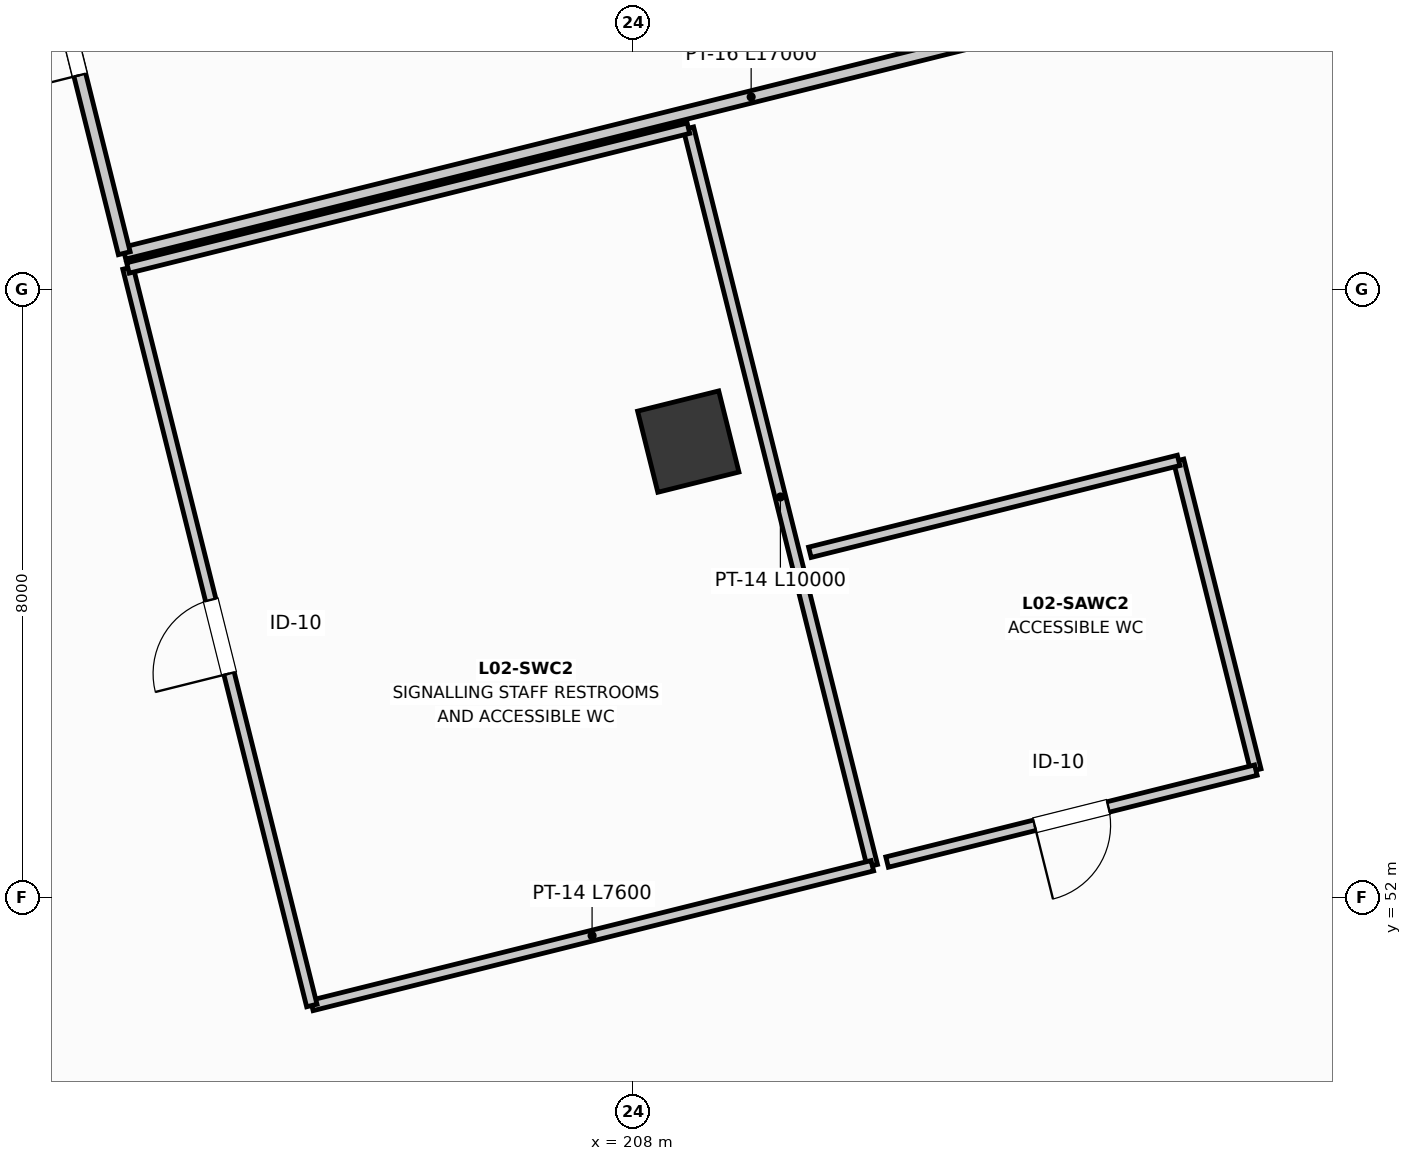
"""IFC4 building model, lengths in metres.
Left out: names, types, materials, properties, quantities, classifications, styles, units other than length and angle.
Written with IfcOpenShell. Run it as: python <this file> out.ifc"""

import sys

from ifc_helpers import new_model, si_unit, direction, frame, frame_2d, origin, origin_2d, place, context, subcontext, project, spatial, rectangle, extrude, element, fill, save


model = new_model("IFC4")
c1 = context("Model", 3, precision=1e-05, world=origin(), true_north=direction((0.0, 1.0)))
c2 = subcontext(c1, "Body", "Model", "MODEL_VIEW")
j1 = project(units=[si_unit("LENGTHUNIT", "METRE"), si_unit("PLANEANGLEUNIT", "RADIAN")], contexts=[c1])
p1 = place(None, origin())
s1 = spatial("IfcSite", under=j1, at=p1, CompositionType="ELEMENT")
p2 = place(p1, origin())
s2 = spatial("IfcBuilding", under=s1, at=p2, CompositionType="ELEMENT")
p3 = place(p2, frame((0.0, 0.0, 11.4)))
s3 = spatial("IfcBuildingStorey", under=s2, at=p3, CompositionType="ELEMENT", Elevation=11.4)
p4 = place(p3, frame((208.722, 57.999, 0.0), z_axis=(0.0, 0.0, 1.0), x_axis=(0.970295726276, 0.2419218956, 0.0)))
e1 = element("IfcColumn", 1, at=p4, inside=s3, PredefinedType="COLUMN", context=c2, shape_type="SweptSolid", body=[
    extrude(rectangle(XDim=1.1, YDim=1.1, at=origin_2d()), origin(), (0.0, 0.0, 1.0), 4.8),
])
p5 = place(p3, frame((208.724, 62.122, 0.0), z_axis=(0.0, 0.0, 1.0), x_axis=(0.241921455101, -0.970295836104, 0.0)))
e2 = element("IfcWall", 2, at=p5, inside=s3, PredefinedType="PARTITIONING", context=c2, shape_type="SweptSolid", body=[
    extrude(rectangle(XDim=10.0, YDim=0.14, at=frame_2d((5.0, 0.0))), origin(), (0.0, 0.0, 1.0), 3.785),
])
p6 = place(p3, frame((211.143, 52.419, 0.0), z_axis=(0.0, 0.0, 1.0), x_axis=(-0.970295558209, -0.241922569678, 0.0)))
e3 = element("IfcWall", 3, at=p6, inside=s3, PredefinedType="PARTITIONING", context=c2, shape_type="SweptSolid", body=[
    extrude(rectangle(XDim=7.6, YDim=0.14, at=frame_2d((3.8, 0.0))), origin(), (0.0, 0.0, 1.0), 3.225),
])
p7 = place(p3, frame((203.769, 50.58, 0.0), z_axis=(0.0, 0.0, 1.0), x_axis=(-0.241921455101, 0.970295836104, 0.0)))
e4 = element("IfcWall", 4, at=p7, inside=s3, PredefinedType="PARTITIONING", context=c2, shape_type="SweptSolid", body=[
    extrude(rectangle(XDim=10.0, YDim=0.14, at=frame_2d((5.0, 0.0))), origin(), (0.0, 0.0, 1.0), 3.325),
])
p8 = place(p7, frame((4.5, 0.0, 0.0)))
e5 = element("IfcOpeningElement", 5, at=p8, cuts=e4, PredefinedType="OPENING", context=c2, shape_type="SweptSolid", body=[
    extrude(rectangle(XDim=1.0, YDim=2.15, at=frame_2d((0.5, 1.075))), frame((0.0, 0.08, 0.0), z_axis=(0.0, -1.0, 0.0), x_axis=(1.0, 0.0, 0.0)), (0.0, 0.0, 1.0), 0.16),
])
p9 = place(p3, frame((201.35, 60.283, 0.0), z_axis=(0.0, 0.0, 1.0), x_axis=(0.970295558209, 0.241922569678, 0.0)))
e6 = element("IfcWall", 6, at=p9, inside=s3, PredefinedType="PARTITIONING", context=c2, shape_type="SweptSolid", body=[
    extrude(rectangle(XDim=7.6, YDim=0.14, at=frame_2d((3.8, 0.0))), origin(), (0.0, 0.0, 1.0), 3.785),
])
p10 = place(p3, frame((215.173, 57.752, 0.0), z_axis=(0.0, 0.0, 1.0), x_axis=(0.24193053095, -0.9702935732, 0.0)))
e7 = element("IfcWall", 7, at=p10, inside=s3, PredefinedType="PARTITIONING", context=c2, shape_type="SweptSolid", body=[
    extrude(rectangle(XDim=4.2, YDim=0.14, at=frame_2d((2.1, 0.0))), origin(), (0.0, 0.0, 1.0), 4.155),
])
p11 = place(p3, frame((216.189, 53.677, 0.0), z_axis=(0.0, 0.0, 1.0), x_axis=(-0.970291726552, -0.241937937052, 0.0)))
e8 = element("IfcWall", 8, at=p11, inside=s3, PredefinedType="PARTITIONING", context=c2, shape_type="SweptSolid", body=[
    extrude(rectangle(XDim=5.0, YDim=0.14, at=frame_2d((2.5, 0.0))), origin(), (0.0, 0.0, 1.0), 4.43),
])
p12 = place(p11, frame((2.0, 0.0, 0.0)))
e9 = element("IfcOpeningElement", 9, at=p12, cuts=e8, PredefinedType="OPENING", context=c2, shape_type="SweptSolid", body=[
    extrude(rectangle(XDim=1.0, YDim=2.15, at=frame_2d((0.5, 1.075))), frame((0.0, 0.08, 0.0), z_axis=(0.0, -1.0, 0.0), x_axis=(1.0, 0.0, 0.0)), (0.0, 0.0, 1.0), 0.16),
])
p13 = place(p3, frame((210.321, 56.542, 0.0), z_axis=(0.0, 0.0, 1.0), x_axis=(0.970296421359, 0.241919107756, 0.0)))
e10 = element("IfcWall", 10, at=p13, inside=s3, PredefinedType="PARTITIONING", context=c2, shape_type="SweptSolid", body=[
    extrude(rectangle(XDim=5.0, YDim=0.14, at=frame_2d((2.5, 0.0))), origin(), (0.0, 0.0, 1.0), 4.43),
])
p14 = place(p3, frame((217.797, 64.59, 0.0), z_axis=(0.0, 0.0, 1.0), x_axis=(-0.970296629409, -0.241918273301, 0.0)))
e11 = element("IfcWall", 11, at=p14, inside=s3, PredefinedType="PARTITIONING", context=c2, shape_type="SweptSolid", body=[
    extrude(rectangle(XDim=17.0, YDim=0.16, at=frame_2d((8.5, 0.0))), origin(), (0.0, 0.0, 1.0), 3.785),
])
p15 = place(p3, frame((201.302, 60.477, 0.0), z_axis=(0.0, 0.0, 1.0), x_axis=(-0.241924086589, 0.970295179998, 0.0)))
e12 = element("IfcWall", 12, at=p15, inside=s3, PredefinedType="PARTITIONING", context=c2, shape_type="SweptSolid", body=[
    extrude(rectangle(XDim=17.2, YDim=0.16, at=frame_2d((8.6, 0.0))), origin(), (0.0, 0.0, 1.0), 3.325),
])
p16 = place(p15, frame((2.415, 0.0, 0.0)))
e13 = element("IfcOpeningElement", 13, at=p16, cuts=e12, PredefinedType="OPENING", context=c2, shape_type="SweptSolid", body=[
    extrude(rectangle(XDim=1.1, YDim=2.2, at=frame_2d((0.55, 1.1))), frame((0.0, 0.09, 0.0), z_axis=(0.0, -1.0, 0.0), x_axis=(1.0, 0.0, 0.0)), (0.0, 0.0, 1.0), 0.18),
])
p17 = place(p8, origin())
e14 = element("IfcDoor", 14, at=p17, inside=s3, OperationType="SINGLE_SWING_LEFT", PredefinedType="DOOR", context=c2, shape_type="SweptSolid", body=[
    extrude(rectangle(XDim=1.0, YDim=2.15, at=frame_2d((0.5, 1.075))), frame((0.0, 0.025, 0.0), z_axis=(0.0, -1.0, 0.0), x_axis=(1.0, 0.0, 0.0)), (0.0, 0.0, 1.0), 0.05),
])
fill(e5, e14)
p18 = place(p12, origin())
e15 = element("IfcDoor", 15, at=p18, inside=s3, OperationType="SINGLE_SWING_RIGHT", PredefinedType="DOOR", context=c2, shape_type="SweptSolid", body=[
    extrude(rectangle(XDim=1.0, YDim=2.15, at=frame_2d((0.5, 1.075))), frame((0.0, 0.025, 0.0), z_axis=(0.0, -1.0, 0.0), x_axis=(1.0, 0.0, 0.0)), (0.0, 0.0, 1.0), 0.05),
])
fill(e9, e15)
p19 = place(p16, origin())
e16 = element("IfcDoor", 16, at=p19, inside=s3, OperationType="SINGLE_SWING_LEFT", PredefinedType="DOOR", context=c2, shape_type="SweptSolid", body=[
    extrude(rectangle(XDim=1.1, YDim=2.2, at=frame_2d((0.55, 1.1))), frame((0.0, 0.025, 0.0), z_axis=(0.0, -1.0, 0.0), x_axis=(1.0, 0.0, 0.0)), (0.0, 0.0, 1.0), 0.05),
])
fill(e13, e16)
save(model, sys.argv[1])
